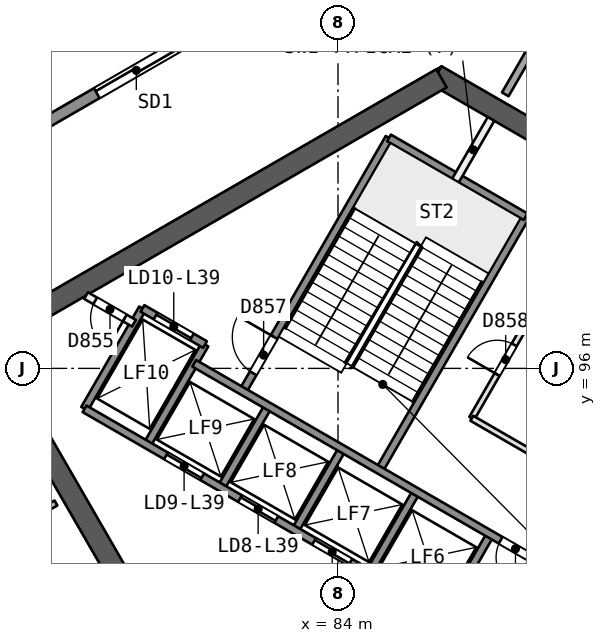
"""IFC4 building model, lengths in metres.
Left out: names, types, materials, properties, quantities, classifications, styles, units other than length and angle.
Written with IfcOpenShell. Run it as: python <this file> out.ifc"""

import sys

from ifc_helpers import new_model, si_unit, direction, frame, frame_2d, origin, place, context, subcontext, project, spatial, rectangle, extrude, element, fill, save


model = new_model("IFC4")
c1 = context("Model", 3, precision=1e-05, world=origin(), true_north=direction((0.0, 1.0)))
c2 = subcontext(c1, "Body", "Model", "MODEL_VIEW")
j1 = project(units=[si_unit("LENGTHUNIT", "METRE"), si_unit("PLANEANGLEUNIT", "RADIAN")], contexts=[c1])
p1 = place(None, origin())
s1 = spatial("IfcSite", under=j1, at=p1, CompositionType="ELEMENT")
p2 = place(p1, origin())
s2 = spatial("IfcBuilding", under=s1, at=p2, CompositionType="ELEMENT")
p3 = place(p2, frame((0.0, 0.0, 163.7)))
s3 = spatial("IfcBuildingStorey", under=s2, at=p3, CompositionType="ELEMENT", Elevation=163.7)
p4 = place(p3, frame((89.605, 101.969, 0.0), z_axis=(0.0, 0.0, 1.0), x_axis=(-0.865997833373, 0.500047750313, 0.0)))
e1 = element("IfcWall", 1, at=p4, inside=s3, PredefinedType="SHEAR", context=c2, shape_type="SweptSolid", body=[
    extrude(rectangle(XDim=3.487, YDim=0.55, at=frame_2d((1.743, 0.0))), origin(), (0.0, 0.0, 1.0), 3.7),
])
p5 = place(p3, frame((86.723, 103.633, 0.0), z_axis=(0.0, 0.0, 1.0), x_axis=(-0.866023530946, -0.500003243837, 0.0)))
e2 = element("IfcWall", 2, at=p5, inside=s3, PredefinedType="SHEAR", context=c2, shape_type="SweptSolid", body=[
    extrude(rectangle(XDim=14.175, YDim=0.55, at=frame_2d((7.087, 0.0))), origin(), (0.0, 0.0, 1.0), 3.7),
])
p6 = place(p3, frame((74.686, 96.683, 0.0), z_axis=(0.0, 0.0, 1.0), x_axis=(0.499997818338, -0.866026663364, 0.0)))
e3 = element("IfcWall", 3, at=p6, inside=s3, PredefinedType="SHEAR", context=c2, shape_type="SweptSolid", body=[
    extrude(rectangle(XDim=10.105, YDim=0.55, at=frame_2d((5.052, 0.0))), origin(), (0.0, 0.0, 1.0), 3.7),
])
p7 = place(p6, frame((7.955, 0.0, 0.0)))
e4 = element("IfcOpeningElement", 4, at=p7, cuts=e3, PredefinedType="OPENING", context=c2, shape_type="SweptSolid", body=[
    extrude(rectangle(XDim=1.2, YDim=2.1, at=frame_2d((0.6, 1.05))), frame((0.0, 0.286, 0.0), z_axis=(0.0, -1.0, 0.0), x_axis=(1.0, 0.0, 0.0)), (0.0, 0.0, 1.0), 0.571),
])
p8 = place(p3, frame((91.332, 108.286, 0.0), z_axis=(0.0, 0.0, 1.0), x_axis=(-0.499988124798, -0.866032259827, 0.0)))
e5 = element("IfcWall", 5, at=p8, inside=s3, PredefinedType="PARTITIONING", context=c2, shape_type="SweptSolid", body=[
    extrude(rectangle(XDim=5.86, YDim=0.2, at=frame_2d((2.93, 0.0))), origin(), (0.0, 0.0, 1.0), 3.25),
])
p9 = place(p3, frame((74.498, 91.257, 0.0), z_axis=(0.0, 0.0, 1.0), x_axis=(0.866038271014, 0.499977712642, 0.0)))
e6 = element("IfcWall", 6, at=p9, inside=s3, PredefinedType="PARTITIONING", context=c2, shape_type="SweptSolid", body=[
    extrude(rectangle(XDim=2.401, YDim=0.15, at=frame_2d((1.2, 0.0))), origin(), (0.0, 0.0, 1.0), 3.25),
])
p10 = place(p3, frame((42.189, 82.766, 0.0), z_axis=(0.0, 0.0, 1.0), x_axis=(0.866025862562, 0.499999205373, 0.0)))
e7 = element("IfcWall", 7, at=p10, inside=s3, PredefinedType="SOLIDWALL", context=c2, shape_type="SweptSolid", body=[
    extrude(rectangle(XDim=54.064, YDim=0.3, at=frame_2d((27.032, 0.0))), origin(), (0.0, 0.0, 1.0), 3.25),
])
p11 = place(p10, frame((20.688, 0.0, 0.0)))
e8 = element("IfcOpeningElement", 8, at=p11, cuts=e7, PredefinedType="OPENING", context=c2, shape_type="SweptSolid", body=[
    extrude(rectangle(XDim=2.4, YDim=2.4, at=frame_2d((1.2, 1.2))), frame((0.0, 0.161, 0.0), z_axis=(0.0, -1.0, 0.0), x_axis=(1.0, 0.0, 0.0)), (0.0, 0.0, 1.0), 0.321),
])
p12 = place(p10, frame((9.629, 0.0, 0.0)))
e9 = element("IfcOpeningElement", 9, at=p12, cuts=e7, PredefinedType="OPENING", context=c2, shape_type="SweptSolid", body=[
    extrude(rectangle(XDim=2.4, YDim=2.4, at=frame_2d((1.2, 1.2))), frame((0.0, 0.161, 0.0), z_axis=(0.0, -1.0, 0.0), x_axis=(1.0, 0.0, 0.0)), (0.0, 0.0, 1.0), 0.321),
])
p13 = place(p10, frame((40.951, 0.0, 0.0)))
e10 = element("IfcOpeningElement", 10, at=p13, cuts=e7, PredefinedType="OPENING", context=c2, shape_type="SweptSolid", body=[
    extrude(rectangle(XDim=2.4, YDim=2.4, at=frame_2d((1.2, 1.2))), frame((0.0, 0.161, 0.0), z_axis=(0.0, -1.0, 0.0), x_axis=(1.0, 0.0, 0.0)), (0.0, 0.0, 1.0), 0.321),
])
p14 = place(p10, frame((27.847, 0.0, 0.9)))
e11 = element("IfcOpeningElement", 11, at=p14, cuts=e7, PredefinedType="OPENING", context=c2, shape_type="SweptSolid", body=[
    extrude(rectangle(XDim=1.8, YDim=1.5, at=frame_2d((0.9, 0.75))), frame((0.0, 0.161, 0.0), z_axis=(0.0, -1.0, 0.0), x_axis=(1.0, 0.0, 0.0)), (0.0, 0.0, 1.0), 0.321),
])
p15 = place(p10, frame((25.041, 0.0, 0.9)))
e12 = element("IfcOpeningElement", 12, at=p15, cuts=e7, PredefinedType="OPENING", context=c2, shape_type="SweptSolid", body=[
    extrude(rectangle(XDim=1.8, YDim=1.5, at=frame_2d((0.9, 0.75))), frame((0.0, 0.161, 0.0), z_axis=(0.0, -1.0, 0.0), x_axis=(1.0, 0.0, 0.0)), (0.0, 0.0, 1.0), 0.321),
])
p16 = place(p3, frame((86.77, 89.486, 0.0), z_axis=(0.0, 0.0, 1.0), x_axis=(0.499961042966, 0.86604789447, 0.0)))
e13 = element("IfcWall", 13, at=p16, inside=s3, PredefinedType="SOLIDWALL", context=c2, shape_type="SweptSolid", body=[
    extrude(rectangle(XDim=2.48, YDim=0.2, at=frame_2d((1.24, 0.0))), origin(), (0.0, 0.0, 1.0), 3.25),
])
p17 = place(p3, frame((87.521, 94.687, 0.0), z_axis=(0.0, 0.0, 1.0), x_axis=(0.500043727655, 0.866000156139, 0.0)))
e14 = element("IfcWall", 14, at=p17, inside=s3, PredefinedType="PARTITIONING", context=c2, shape_type="SweptSolid", body=[
    extrude(rectangle(XDim=3.618, YDim=0.15, at=frame_2d((1.809, 0.0))), origin(), (0.0, 0.0, 1.0), 3.25),
])
p18 = place(p17, frame((1.332, 0.0, 0.0)))
e15 = element("IfcOpeningElement", 15, at=p18, cuts=e14, PredefinedType="OPENING", context=c2, shape_type="SweptSolid", body=[
    extrude(rectangle(XDim=0.9, YDim=2.1, at=frame_2d((0.45, 1.05))), frame((0.0, 0.085, 0.0), z_axis=(0.0, -1.0, 0.0), x_axis=(1.0, 0.0, 0.0)), (0.0, 0.0, 1.0), 0.171),
])
p19 = place(p3, frame((84.821, 90.611, 0.0), z_axis=(0.0, 0.0, 1.0), x_axis=(0.499961042966, 0.86604789447, 0.0)))
e16 = element("IfcWall", 16, at=p19, inside=s3, PredefinedType="SOLIDWALL", context=c2, shape_type="SweptSolid", body=[
    extrude(rectangle(XDim=2.48, YDim=0.2, at=frame_2d((1.24, 0.0))), origin(), (0.0, 0.0, 1.0), 3.25),
])
p20 = place(p3, frame((85.087, 93.321, 0.0), z_axis=(0.0, 0.0, 1.0), x_axis=(0.500019787375, 0.866013979237, 0.0)))
e17 = element("IfcWall", 17, at=p20, inside=s3, PredefinedType="SOLIDWALL", context=c2, shape_type="SweptSolid", body=[
    extrude(rectangle(XDim=7.7, YDim=0.2, at=frame_2d((3.85, 0.0))), origin(), (0.0, 0.0, 1.0), 3.25),
])
p21 = place(p3, frame((82.873, 91.736, 0.0), z_axis=(0.0, 0.0, 1.0), x_axis=(0.499961042966, 0.86604789447, 0.0)))
e18 = element("IfcWall", 18, at=p21, inside=s3, PredefinedType="SOLIDWALL", context=c2, shape_type="SweptSolid", body=[
    extrude(rectangle(XDim=2.48, YDim=0.2, at=frame_2d((1.24, 0.0))), origin(), (0.0, 0.0, 1.0), 3.25),
])
p22 = place(p3, frame((87.09, 100.94, 0.0), z_axis=(0.0, 0.0, 1.0), x_axis=(0.499951854219, 0.86605319898, 0.0)))
e19 = element("IfcWall", 19, at=p22, inside=s3, PredefinedType="PARTITIONING", context=c2, shape_type="SweptSolid", body=[
    extrude(rectangle(XDim=1.873, YDim=0.2, at=frame_2d((0.937, 0.0))), origin(), (0.0, 0.0, 1.0), 3.25),
])
p23 = place(p3, frame((80.924, 92.861, 0.0), z_axis=(0.0, 0.0, 1.0), x_axis=(0.499961042966, 0.86604789447, 0.0)))
e20 = element("IfcWall", 20, at=p23, inside=s3, PredefinedType="SOLIDWALL", context=c2, shape_type="SweptSolid", body=[
    extrude(rectangle(XDim=2.48, YDim=0.2, at=frame_2d((1.24, 0.0))), origin(), (0.0, 0.0, 1.0), 3.25),
])
p24 = place(p3, frame((81.493, 95.396, 0.0), z_axis=(0.0, 0.0, 1.0), x_axis=(0.500006057782, 0.866021906294, 0.0)))
e21 = element("IfcWall", 21, at=p24, inside=s3, PredefinedType="SOLIDWALL", context=c2, shape_type="SweptSolid", body=[
    extrude(rectangle(XDim=7.7, YDim=0.2, at=frame_2d((3.85, 0.0))), origin(), (0.0, 0.0, 1.0), 3.25),
])
p25 = place(p24, frame((0.55, 0.0, 0.0)))
e22 = element("IfcOpeningElement", 22, at=p25, cuts=e21, PredefinedType="OPENING", context=c2, shape_type="SweptSolid", body=[
    extrude(rectangle(XDim=1.1, YDim=2.1, at=frame_2d((0.55, 1.05))), frame((0.0, 0.11, 0.0), z_axis=(0.0, -1.0, 0.0), x_axis=(1.0, 0.0, 0.0)), (0.0, 0.0, 1.0), 0.221),
])
for number, where, z_axis, x_axis in (
    (23, (78.976, 93.986, 0.0), (0.0, 0.0, 1.0), (0.5, 0.866, 0.0)),
    (24, (77.33, 94.936, 0.0), (0.0, 0.0, 1.0), (0.5, 0.866, 0.0)),
):
    element("IfcWall", number, at=place(p3, frame(where, z_axis=z_axis, x_axis=x_axis)), inside=s3, PredefinedType="SOLIDWALL", context=c2, shape_type="SweptSolid", body=[
        extrude(rectangle(XDim=3.05, YDim=0.2, at=frame_2d((1.525, 0.0))), origin(), (0.0, 0.0, 1.0), 3.25),
    ])
p26 = place(p3, frame((86.77, 89.486, 0.0), z_axis=(0.0, 0.0, 1.0), x_axis=(-0.86601811187, 0.500012629753, 0.0)))
e25 = element("IfcWall", 25, at=p26, inside=s3, PredefinedType="SOLIDWALL", context=c2, shape_type="SweptSolid", body=[
    extrude(rectangle(XDim=10.9, YDim=0.2, at=frame_2d((5.45, 0.0))), origin(), (0.0, 0.0, 1.0), 3.25),
])
p27 = place(p26, frame((0.575, 0.0, 0.0)))
e26 = element("IfcOpeningElement", 26, at=p27, cuts=e25, PredefinedType="OPENING", context=c2, shape_type="SweptSolid", body=[
    extrude(rectangle(XDim=1.1, YDim=2.1, at=frame_2d((0.55, 1.05))), frame((0.0, 0.11, 0.0), z_axis=(0.0, -1.0, 0.0), x_axis=(1.0, 0.0, 0.0)), (0.0, 0.0, 1.0), 0.221),
])
p28 = place(p26, frame((2.825, 0.0, 0.0)))
e27 = element("IfcOpeningElement", 27, at=p28, cuts=e25, PredefinedType="OPENING", context=c2, shape_type="SweptSolid", body=[
    extrude(rectangle(XDim=1.1, YDim=2.1, at=frame_2d((0.55, 1.05))), frame((0.0, 0.11, 0.0), z_axis=(0.0, -1.0, 0.0), x_axis=(1.0, 0.0, 0.0)), (0.0, 0.0, 1.0), 0.221),
])
p29 = place(p26, frame((5.075, 0.0, 0.0)))
e28 = element("IfcOpeningElement", 28, at=p29, cuts=e25, PredefinedType="OPENING", context=c2, shape_type="SweptSolid", body=[
    extrude(rectangle(XDim=1.1, YDim=2.1, at=frame_2d((0.55, 1.05))), frame((0.0, 0.11, 0.0), z_axis=(0.0, -1.0, 0.0), x_axis=(1.0, 0.0, 0.0)), (0.0, 0.0, 1.0), 0.221),
])
p30 = place(p26, frame((7.325, 0.0, 0.0)))
e29 = element("IfcOpeningElement", 29, at=p30, cuts=e25, PredefinedType="OPENING", context=c2, shape_type="SweptSolid", body=[
    extrude(rectangle(XDim=1.1, YDim=2.1, at=frame_2d((0.55, 1.05))), frame((0.0, 0.11, 0.0), z_axis=(0.0, -1.0, 0.0), x_axis=(1.0, 0.0, 0.0)), (0.0, 0.0, 1.0), 0.221),
])
p31 = place(p3, frame((89.33, 90.872, 0.0), z_axis=(0.0, 0.0, 1.0), x_axis=(-0.866027589512, 0.49999621419, 0.0)))
e30 = element("IfcWall", 30, at=p31, inside=s3, PredefinedType="SOLIDWALL", context=c2, shape_type="SweptSolid", body=[
    extrude(rectangle(XDim=10.524, YDim=0.2, at=frame_2d((5.262, 0.0))), origin(), (0.0, 0.0, 1.0), 3.25),
])
p32 = place(p31, frame((0.312, 0.0, 0.0)))
e31 = element("IfcOpeningElement", 31, at=p32, cuts=e30, PredefinedType="OPENING", context=c2, shape_type="SweptSolid", body=[
    extrude(rectangle(XDim=0.9, YDim=2.1, at=frame_2d((0.45, 1.05))), frame((0.0, 0.11, 0.0), z_axis=(0.0, -1.0, 0.0), x_axis=(1.0, 0.0, 0.0)), (0.0, 0.0, 1.0), 0.221),
])
p33 = place(p3, frame((78.63, 97.188, 0.0), z_axis=(0.0, 0.0, 1.0), x_axis=(-0.866003949776, 0.500037157592, 0.0)))
e32 = element("IfcWall", 32, at=p33, inside=s3, PredefinedType="PARTITIONING", context=c2, shape_type="SweptSolid", body=[
    extrude(rectangle(XDim=1.455, YDim=0.2, at=frame_2d((0.728, 0.0))), origin(), (0.0, 0.0, 1.0), 3.25),
])
p34 = place(p33, frame((0.278, 0.0, 0.0)))
e33 = element("IfcOpeningElement", 33, at=p34, cuts=e32, PredefinedType="OPENING", context=c2, shape_type="SweptSolid", body=[
    extrude(rectangle(XDim=0.9, YDim=2.1, at=frame_2d((0.45, 1.05))), frame((0.0, 0.11, 0.0), z_axis=(0.0, -1.0, 0.0), x_axis=(1.0, 0.0, 0.0)), (0.0, 0.0, 1.0), 0.221),
])
p35 = place(p3, frame((80.5, 96.627, 0.0), z_axis=(0.0, 0.0, 1.0), x_axis=(-0.86601224135, 0.500022797313, 0.0)))
e34 = element("IfcWall", 34, at=p35, inside=s3, PredefinedType="SOLIDWALL", context=c2, shape_type="SweptSolid", body=[
    extrude(rectangle(XDim=1.9, YDim=0.2, at=frame_2d((0.95, 0.0))), origin(), (0.0, 0.0, 1.0), 3.25),
])
p36 = place(p35, frame((0.4, 0.0, 0.0)))
e35 = element("IfcOpeningElement", 35, at=p36, cuts=e34, PredefinedType="OPENING", context=c2, shape_type="SweptSolid", body=[
    extrude(rectangle(XDim=1.1, YDim=2.1, at=frame_2d((0.55, 1.05))), frame((0.0, 0.11, 0.0), z_axis=(0.0, -1.0, 0.0), x_axis=(1.0, 0.0, 0.0)), (0.0, 0.0, 1.0), 0.221),
])
p37 = place(p3, frame((89.33, 93.643, 0.0), z_axis=(0.0, 0.0, 1.0), x_axis=(-0.866033778982, 0.499985493453, 0.0)))
e36 = element("IfcWall", 36, at=p37, inside=s3, PredefinedType="PARTITIONING", context=c2, shape_type="SweptSolid", body=[
    extrude(rectangle(XDim=2.089, YDim=0.15, at=frame_2d((1.044, 0.0))), origin(), (0.0, 0.0, 1.0), 3.25),
])
p38 = place(p3, frame((88.937, 99.99, 0.0), z_axis=(0.0, 0.0, 1.0), x_axis=(-0.866004344652, 0.500036473714, 0.0)))
e37 = element("IfcWall", 37, at=p38, inside=s3, PredefinedType="SOLIDWALL", context=c2, shape_type="SweptSolid", body=[
    extrude(rectangle(XDim=4.15, YDim=0.2, at=frame_2d((2.075, 0.0))), origin(), (0.0, 0.0, 1.0), 3.25),
])
p39 = place(p13, origin())
e38 = element("IfcDoor", 38, at=p39, inside=s3, OperationType="SLIDING_TO_LEFT", PredefinedType="NOTDEFINED", context=c2, shape_type="SweptSolid", body=[
    extrude(rectangle(XDim=2.4, YDim=2.4, at=frame_2d((1.2, 1.2))), frame((0.0, 0.025, 0.0), z_axis=(0.0, -1.0, 0.0), x_axis=(1.0, 0.0, 0.0)), (0.0, 0.0, 1.0), 0.05),
])
fill(e10, e38)
p40 = place(p28, origin())
e39 = element("IfcDoor", 39, at=p40, inside=s3, OperationType="SLIDING_TO_LEFT", PredefinedType="NOTDEFINED", context=c2, shape_type="SweptSolid", body=[
    extrude(rectangle(XDim=1.1, YDim=2.1, at=frame_2d((0.55, 1.05))), frame((0.0, 0.025, 0.0), z_axis=(0.0, -1.0, 0.0), x_axis=(1.0, 0.0, 0.0)), (0.0, 0.0, 1.0), 0.05),
])
fill(e27, e39)
p41 = place(p29, origin())
e40 = element("IfcDoor", 40, at=p41, inside=s3, OperationType="SLIDING_TO_RIGHT", PredefinedType="NOTDEFINED", context=c2, shape_type="SweptSolid", body=[
    extrude(rectangle(XDim=1.1, YDim=2.1, at=frame_2d((0.55, 1.05))), frame((0.0, 0.025, 0.0), z_axis=(0.0, -1.0, 0.0), x_axis=(1.0, 0.0, 0.0)), (0.0, 0.0, 1.0), 0.05),
])
fill(e28, e40)
p42 = place(p30, origin())
e41 = element("IfcDoor", 41, at=p42, inside=s3, OperationType="SLIDING_TO_LEFT", PredefinedType="NOTDEFINED", context=c2, shape_type="SweptSolid", body=[
    extrude(rectangle(XDim=1.1, YDim=2.1, at=frame_2d((0.55, 1.05))), frame((0.0, 0.025, 0.0), z_axis=(0.0, -1.0, 0.0), x_axis=(1.0, 0.0, 0.0)), (0.0, 0.0, 1.0), 0.05),
])
fill(e29, e41)
p43 = place(p36, origin())
e42 = element("IfcDoor", 42, at=p43, inside=s3, OperationType="SLIDING_TO_RIGHT", PredefinedType="NOTDEFINED", context=c2, shape_type="SweptSolid", body=[
    extrude(rectangle(XDim=1.1, YDim=2.1, at=frame_2d((0.55, 1.05))), frame((0.0, 0.025, 0.0), z_axis=(0.0, -1.0, 0.0), x_axis=(1.0, 0.0, 0.0)), (0.0, 0.0, 1.0), 0.05),
])
fill(e35, e42)
p44 = place(p34, origin())
e43 = element("IfcDoor", 43, at=p44, inside=s3, OperationType="SINGLE_SWING_LEFT", PredefinedType="NOTDEFINED", context=c2, shape_type="SweptSolid", body=[
    extrude(rectangle(XDim=0.9, YDim=2.1, at=frame_2d((0.45, 1.05))), frame((0.0, 0.025, 0.0), z_axis=(0.0, -1.0, 0.0), x_axis=(1.0, 0.0, 0.0)), (0.0, 0.0, 1.0), 0.05),
])
fill(e33, e43)
p45 = place(p32, origin())
e44 = element("IfcDoor", 44, at=p45, inside=s3, OperationType="SINGLE_SWING_LEFT", PredefinedType="NOTDEFINED", context=c2, shape_type="SweptSolid", body=[
    extrude(rectangle(XDim=0.9, YDim=2.1, at=frame_2d((0.45, 1.05))), frame((0.0, 0.025, 0.0), z_axis=(0.0, -1.0, 0.0), x_axis=(1.0, 0.0, 0.0)), (0.0, 0.0, 1.0), 0.05),
])
fill(e31, e44)
p46 = place(p25, origin())
e45 = element("IfcDoor", 45, at=p46, inside=s3, OperationType="SINGLE_SWING_RIGHT", PredefinedType="NOTDEFINED", context=c2, shape_type="SweptSolid", body=[
    extrude(rectangle(XDim=1.1, YDim=2.1, at=frame_2d((0.55, 1.05))), frame((0.0, 0.025, 0.0), z_axis=(0.0, -1.0, 0.0), x_axis=(1.0, 0.0, 0.0)), (0.0, 0.0, 1.0), 0.05),
])
fill(e22, e45)
p47 = place(p18, origin())
e46 = element("IfcDoor", 46, at=p47, inside=s3, OperationType="SINGLE_SWING_LEFT", PredefinedType="NOTDEFINED", context=c2, shape_type="SweptSolid", body=[
    extrude(rectangle(XDim=0.9, YDim=2.1, at=frame_2d((0.45, 1.05))), frame((0.0, 0.025, 0.0), z_axis=(0.0, -1.0, 0.0), x_axis=(1.0, 0.0, 0.0)), (0.0, 0.0, 1.0), 0.05),
])
fill(e15, e46)
save(model, sys.argv[1])
